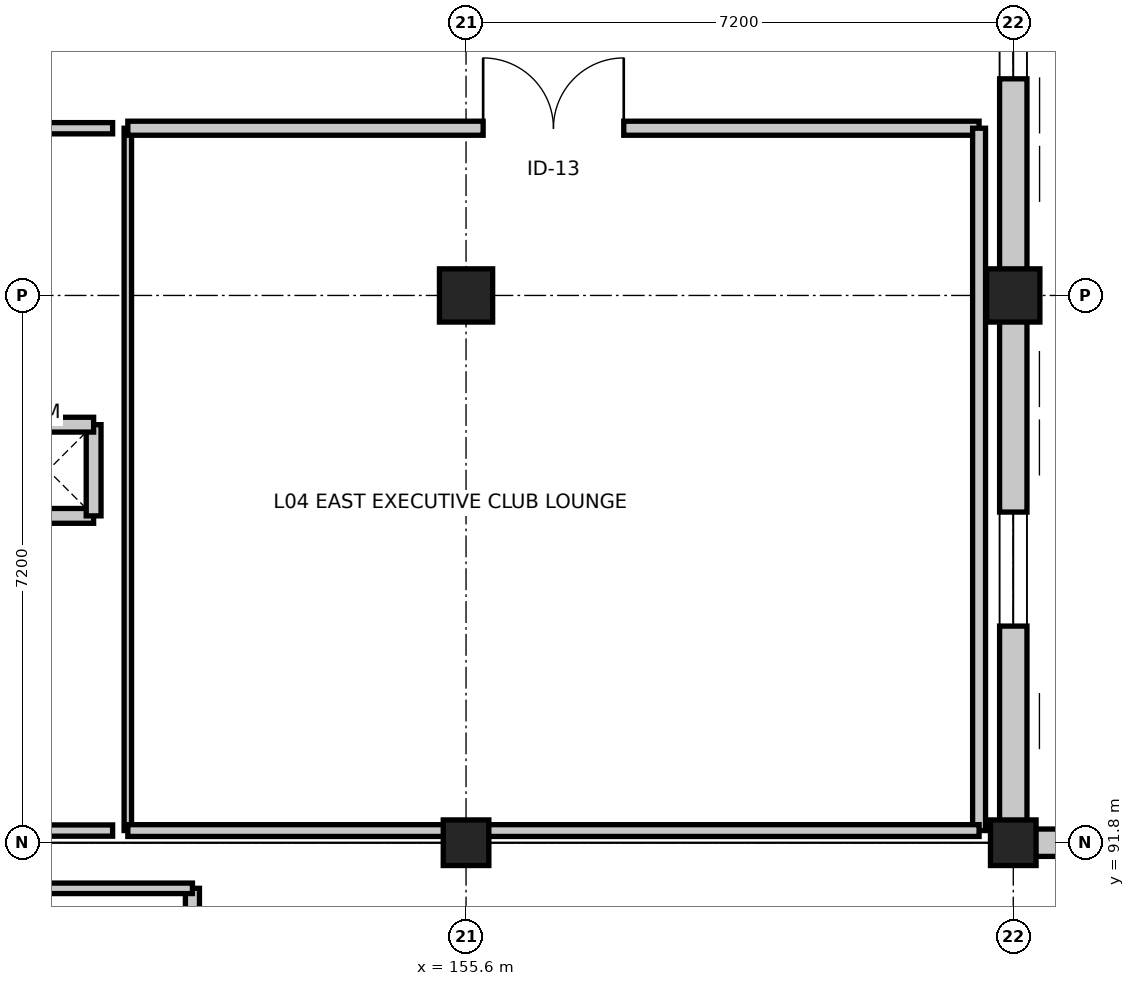
"""IFC4 building model, lengths in metres.
Left out: names, types, materials, properties, quantities, classifications, styles, units other than length and angle.
Written with IfcOpenShell. Run it as: python <this file> out.ifc"""

import sys

from ifc_helpers import new_model, si_unit, direction, frame, frame_2d, origin, origin_2d, place, context, subcontext, project, spatial, rectangle, extrude, element, fill, save


model = new_model("IFC4")
c1 = context("Model", 3, precision=1e-05, world=origin(), true_north=direction((0.0, 1.0)))
c2 = subcontext(c1, "Body", "Model", "MODEL_VIEW")
j1 = project(units=[si_unit("LENGTHUNIT", "METRE"), si_unit("PLANEANGLEUNIT", "RADIAN")], contexts=[c1])
p1 = place(None, origin())
s1 = spatial("IfcSite", under=j1, at=p1, CompositionType="ELEMENT")
p2 = place(p1, origin())
s2 = spatial("IfcBuilding", under=s1, at=p2, CompositionType="ELEMENT")
p3 = place(p2, frame((0.0, 0.0, 19.2)))
s3 = spatial("IfcBuildingStorey", under=s2, at=p3, CompositionType="ELEMENT", Elevation=19.2)
p4 = place(p3, frame((155.6, 91.8, 0.0), z_axis=(0.0, 0.0, 1.0), x_axis=(1.0, 0.0, 0.0)))
e1 = element("IfcColumn", 1, at=p4, inside=s3, PredefinedType="COLUMN", context=c2, shape_type="SweptSolid", body=[
    extrude(rectangle(XDim=0.6, YDim=0.6, at=origin_2d()), origin(), (0.0, 0.0, 1.0), 3.6),
])
p5 = place(p3, frame((155.6, 99.0, 0.0), z_axis=(0.0, 0.0, 1.0), x_axis=(1.0, 0.0, 0.0)))
e2 = element("IfcColumn", 2, at=p5, inside=s3, PredefinedType="COLUMN", context=c2, shape_type="SweptSolid", body=[
    extrude(rectangle(XDim=0.7, YDim=0.7, at=origin_2d()), origin(), (0.0, 0.0, 1.0), 3.6),
])
p6 = place(p3, frame((162.8, 91.8, 0.0), z_axis=(0.0, 0.0, 1.0), x_axis=(1.0, 0.0, 0.0)))
e3 = element("IfcColumn", 3, at=p6, inside=s3, PredefinedType="COLUMN", context=c2, shape_type="SweptSolid", body=[
    extrude(rectangle(XDim=0.6, YDim=0.6, at=origin_2d()), origin(), (0.0, 0.0, 1.0), 3.6),
])
p7 = place(p3, frame((162.8, 99.0, 0.0), z_axis=(0.0, 0.0, 1.0), x_axis=(1.0, 0.0, 0.0)))
e4 = element("IfcColumn", 4, at=p7, inside=s3, PredefinedType="COLUMN", context=c2, shape_type="SweptSolid", body=[
    extrude(rectangle(XDim=0.7, YDim=0.7, at=origin_2d()), origin(), (0.0, 0.0, 1.0), 3.6),
])
p8 = place(p3, frame((162.8, 106.2, 0.0), z_axis=(0.0, 0.0, 1.0), x_axis=(0.0, -1.0, 0.0)))
e5 = element("IfcWall", 5, at=p8, inside=s3, PredefinedType="STANDARD", context=c2, shape_type="SweptSolid", body=[
    extrude(rectangle(XDim=7.2, YDim=0.36, at=frame_2d((3.6, 0.0))), origin(), (0.0, 0.0, 1.0), 2.685),
])
p9 = place(p8, frame((2.85, 0.0, 0.75)))
e6 = element("IfcOpeningElement", 6, at=p9, cuts=e5, PredefinedType="OPENING", context=c2, shape_type="SweptSolid", body=[
    extrude(rectangle(XDim=1.5, YDim=1.5, at=frame_2d((0.75, 0.75))), frame((0.0, 0.19, 0.0), z_axis=(0.0, -1.0, 0.0), x_axis=(1.0, 0.0, 0.0)), (0.0, 0.0, 1.0), 0.38),
])
p10 = place(p3, frame((162.8, 99.0, 0.0), z_axis=(0.0, 0.0, 1.0), x_axis=(0.0, -1.0, 0.0)))
e7 = element("IfcWall", 7, at=p10, inside=s3, PredefinedType="STANDARD", context=c2, shape_type="SweptSolid", body=[
    extrude(rectangle(XDim=7.2, YDim=0.36, at=frame_2d((3.6, 0.0))), origin(), (0.0, 0.0, 1.0), 2.685),
])
p11 = place(p10, frame((2.85, 0.0, 0.75)))
e8 = element("IfcOpeningElement", 8, at=p11, cuts=e7, PredefinedType="OPENING", context=c2, shape_type="SweptSolid", body=[
    extrude(rectangle(XDim=1.5, YDim=1.5, at=frame_2d((0.75, 0.75))), frame((0.0, 0.19, 0.0), z_axis=(0.0, -1.0, 0.0), x_axis=(1.0, 0.0, 0.0)), (0.0, 0.0, 1.0), 0.38),
])
p12 = place(p3, frame((162.8, 91.8, 0.0), z_axis=(0.0, 0.0, 1.0), x_axis=(1.0, 0.0, 0.0)))
e9 = element("IfcWall", 9, at=p12, inside=s3, PredefinedType="STANDARD", context=c2, shape_type="SweptSolid", body=[
    extrude(rectangle(XDim=7.2, YDim=0.36, at=frame_2d((3.6, 0.0))), origin(), (0.0, 0.0, 1.0), 2.735),
])
p13 = place(p12, frame((2.85, 0.0, 0.75)))
e10 = element("IfcOpeningElement", 10, at=p13, cuts=e9, PredefinedType="OPENING", context=c2, shape_type="SweptSolid", body=[
    extrude(rectangle(XDim=1.5, YDim=1.5, at=frame_2d((0.75, 0.75))), frame((0.0, 0.19, 0.0), z_axis=(0.0, -1.0, 0.0), x_axis=(1.0, 0.0, 0.0)), (0.0, 0.0, 1.0), 0.38),
])
for number, where, z_axis, x_axis in (
    (11, (149.5, 96.1, 0.0), (0.0, 0.0, 1.0), (1.0, 0.0, 0.0)),
    (12, (150.7, 96.1, 0.0), (0.0, 0.0, 1.0), (0.0, 1.0, 0.0)),
    (13, (150.7, 97.3, 0.0), (0.0, 0.0, 1.0), (-1.0, 0.0, 0.0)),
):
    element("IfcWall", number, at=place(p3, frame(where, z_axis=z_axis, x_axis=x_axis)), inside=s3, PredefinedType="PARAPET", context=c2, shape_type="SweptSolid", body=[
        extrude(rectangle(XDim=1.2, YDim=0.195, at=frame_2d((0.6, 0.0))), origin(), (0.0, 0.0, 1.0), 3.35),
    ])
p14 = place(p3, frame((151.15, 91.96, 0.0), z_axis=(0.0, 0.0, 1.0), x_axis=(0.0, 1.0, 0.0)))
e14 = element("IfcWall", 14, at=p14, inside=s3, PredefinedType="PARTITIONING", context=c2, shape_type="SweptSolid", body=[
    extrude(rectangle(XDim=9.24, YDim=0.098, at=frame_2d((4.62, 0.0))), origin(), (0.0, 0.0, 1.0), 2.735),
])
p15 = place(p3, frame((151.15, 101.2, 0.0), z_axis=(0.0, 0.0, 1.0), x_axis=(1.0, 0.0, 0.0)))
e15 = element("IfcWall", 15, at=p15, inside=s3, PredefinedType="PARTITIONING", context=c2, shape_type="SweptSolid", body=[
    extrude(rectangle(XDim=11.2, YDim=0.185, at=frame_2d((5.6, 0.0))), origin(), (0.0, 0.0, 1.0), 2.685),
])
p16 = place(p15, frame((4.675, 0.0, 0.0)))
e16 = element("IfcOpeningElement", 16, at=p16, cuts=e15, PredefinedType="OPENING", context=c2, shape_type="SweptSolid", body=[
    extrude(rectangle(XDim=1.85, YDim=2.3, at=frame_2d((0.925, 1.15))), frame((0.0, 0.103, 0.0), z_axis=(0.0, -1.0, 0.0), x_axis=(1.0, 0.0, 0.0)), (0.0, 0.0, 1.0), 0.205),
])
p17 = place(p3, frame((162.35, 101.2, 0.0), z_axis=(0.0, 0.0, 1.0), x_axis=(0.0, -1.0, 0.0)))
e17 = element("IfcWall", 17, at=p17, inside=s3, PredefinedType="PARTITIONING", context=c2, shape_type="SweptSolid", body=[
    extrude(rectangle(XDim=9.24, YDim=0.17, at=frame_2d((4.62, 0.0))), origin(), (0.0, 0.0, 1.0), 2.735),
])
p18 = place(p3, frame((162.35, 91.96, 0.0), z_axis=(0.0, 0.0, 1.0), x_axis=(-1.0, 0.0, 0.0)))
e18 = element("IfcWall", 18, at=p18, inside=s3, PredefinedType="PARTITIONING", context=c2, shape_type="SweptSolid", body=[
    extrude(rectangle(XDim=11.2, YDim=0.155, at=frame_2d((5.6, 0.0))), origin(), (0.0, 0.0, 1.0), 2.735),
])
p19 = place(p3, frame((150.95, 91.96, 0.0), z_axis=(0.0, 0.0, 1.0), x_axis=(-1.0, 0.0, 0.0)))
e19 = element("IfcWall", 19, at=p19, inside=s3, PredefinedType="PARTITIONING", context=c2, shape_type="SweptSolid", body=[
    extrude(rectangle(XDim=23.59, YDim=0.148, at=frame_2d((11.795, 0.0))), origin(), (0.0, 0.0, 1.0), 2.735),
])
p20 = place(p3, frame((138.21, 101.2, 0.0), z_axis=(0.0, 0.0, 1.0), x_axis=(1.0, 0.0, 0.0)))
e20 = element("IfcWall", 20, at=p20, inside=s3, PredefinedType="PARTITIONING", context=c2, shape_type="SweptSolid", body=[
    extrude(rectangle(XDim=12.74, YDim=0.148, at=frame_2d((6.37, 0.0))), origin(), (0.0, 0.0, 1.0), 2.685),
])
p21 = place(p3, frame((152.0, 91.2, 0.0), z_axis=(0.0, 0.0, 1.0), x_axis=(0.0, -1.0, 0.0)))
e21 = element("IfcWall", 21, at=p21, inside=s3, PredefinedType="PARTITIONING", context=c2, shape_type="SweptSolid", body=[
    extrude(rectangle(XDim=12.8, YDim=0.185, at=frame_2d((6.4, 0.0))), origin(), (0.0, 0.0, 1.0), 2.926),
])
p22 = place(p21, frame((5.85, 0.0, 0.0)))
e22 = element("IfcOpeningElement", 22, at=p22, cuts=e21, PredefinedType="OPENING", context=c2, shape_type="SweptSolid", body=[
    extrude(rectangle(XDim=1.1, YDim=2.18, at=frame_2d((0.55, 1.09))), frame((0.0, 0.103, 0.0), z_axis=(0.0, -1.0, 0.0), x_axis=(1.0, 0.0, 0.0)), (0.0, 0.0, 1.0), 0.205),
])
p23 = place(p3, frame((144.07, 91.2, 0.0), z_axis=(0.0, 0.0, 1.0), x_axis=(1.0, 0.0, 0.0)))
e23 = element("IfcWall", 23, at=p23, inside=s3, PredefinedType="PARTITIONING", context=c2, shape_type="SweptSolid", body=[
    extrude(rectangle(XDim=7.93, YDim=0.138, at=frame_2d((3.965, 0.0))), origin(), (0.0, 0.0, 1.0), 2.926),
])
p24 = place(p9, origin())
e24 = element("IfcWindow", 24, at=p24, inside=s3, PartitioningType="SINGLE_PANEL", PredefinedType="WINDOW", context=c2, shape_type="SweptSolid", body=[
    extrude(rectangle(XDim=1.5, YDim=1.5, at=frame_2d((0.75, 0.75))), frame((0.0, 0.03, 0.0), z_axis=(0.0, -1.0, 0.0), x_axis=(1.0, 0.0, 0.0)), (0.0, 0.0, 1.0), 0.06),
])
fill(e6, e24)
p25 = place(p11, origin())
e25 = element("IfcWindow", 25, at=p25, inside=s3, PartitioningType="SINGLE_PANEL", PredefinedType="WINDOW", context=c2, shape_type="SweptSolid", body=[
    extrude(rectangle(XDim=1.5, YDim=1.5, at=frame_2d((0.75, 0.75))), frame((0.0, 0.03, 0.0), z_axis=(0.0, -1.0, 0.0), x_axis=(1.0, 0.0, 0.0)), (0.0, 0.0, 1.0), 0.06),
])
fill(e8, e25)
p26 = place(p16, origin())
e26 = element("IfcDoor", 26, at=p26, inside=s3, OperationType="DOUBLE_DOOR_SINGLE_SWING", PredefinedType="DOOR", context=c2, shape_type="SweptSolid", body=[
    extrude(rectangle(XDim=1.85, YDim=2.3, at=frame_2d((0.925, 1.15))), frame((0.0, 0.025, 0.0), z_axis=(0.0, -1.0, 0.0), x_axis=(1.0, 0.0, 0.0)), (0.0, 0.0, 1.0), 0.05),
])
fill(e16, e26)
save(model, sys.argv[1])
